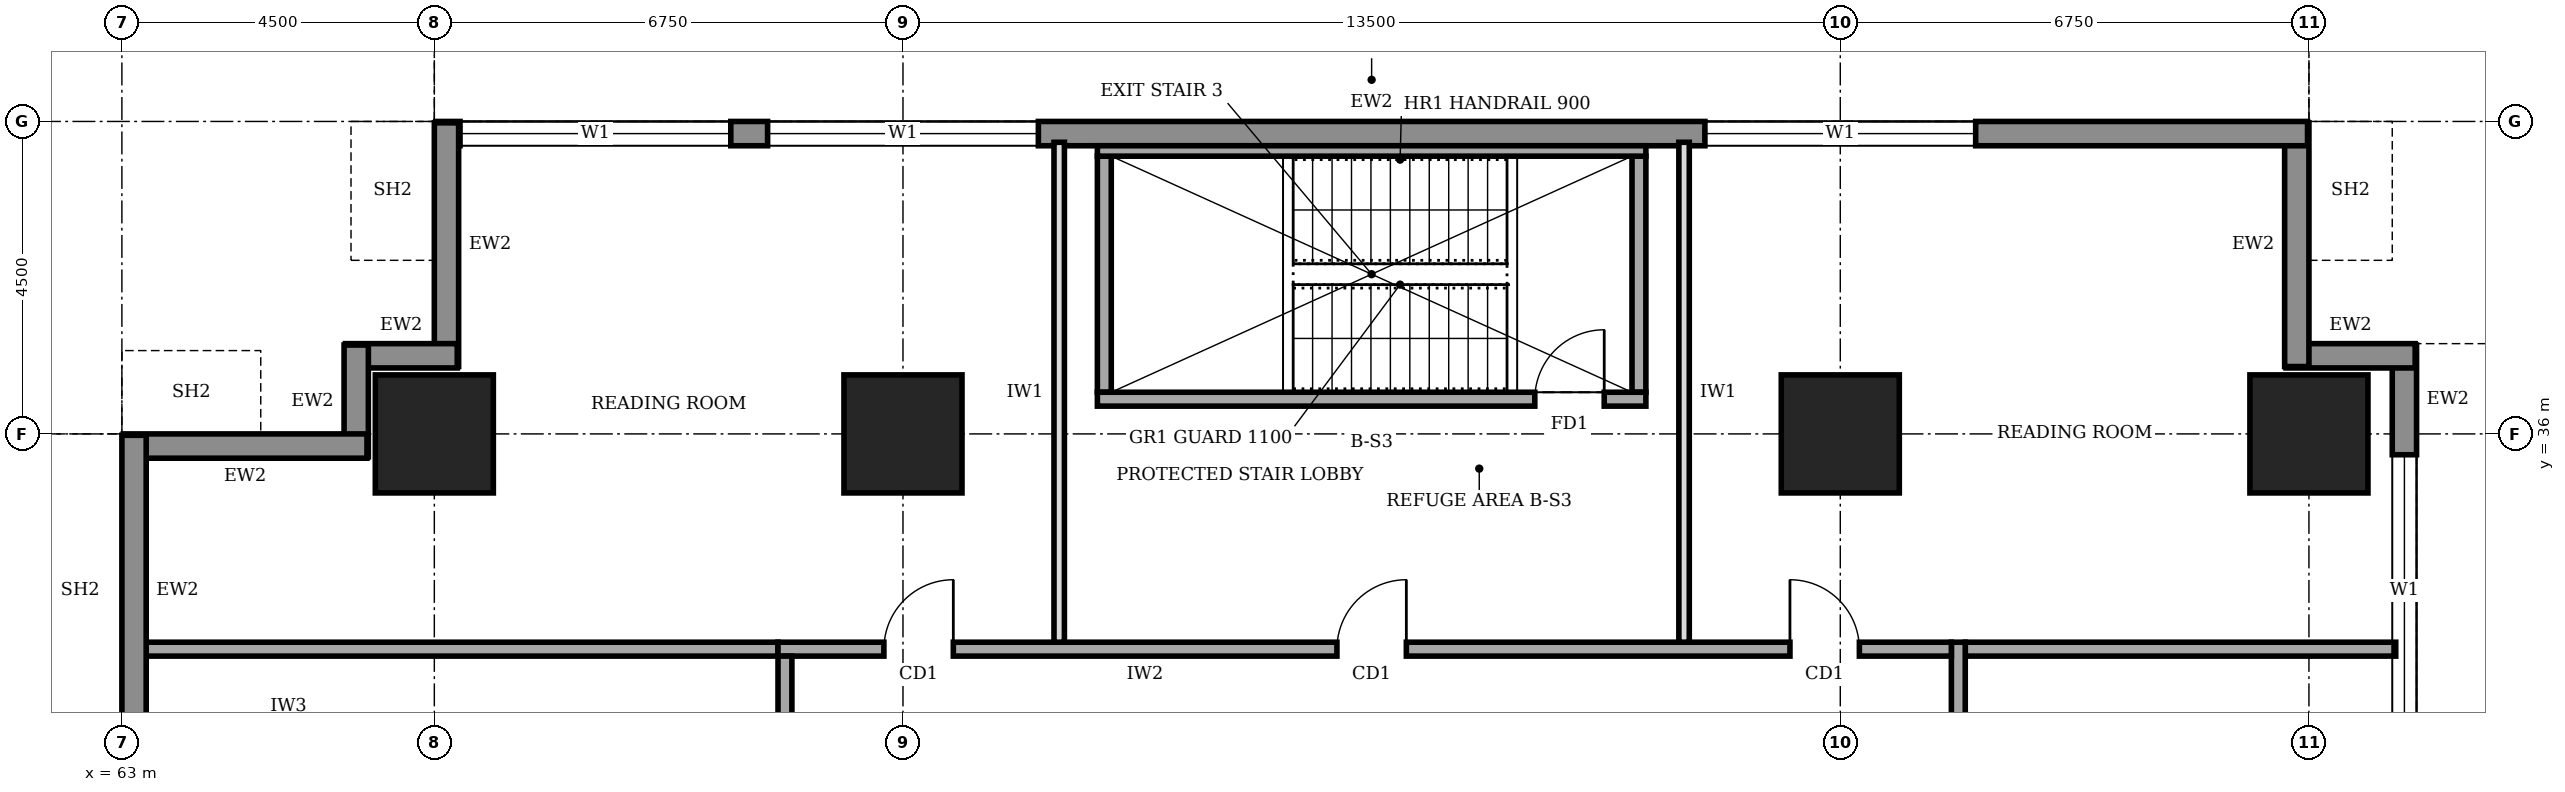
"""IFC4 building model, lengths in metres.
Left out: names, types, materials, properties, quantities, classifications, styles, units other than length and angle.
Written with IfcOpenShell. Run it as: python <this file> out.ifc"""

import sys

from ifc_helpers import new_model, si_unit, direction, frame, frame_2d, origin, origin_2d, place, context, subcontext, project, spatial, rectangle, extrude, element, fill, save


model = new_model("IFC4")
c1 = context("Model", 3, precision=1e-05, world=origin(), true_north=direction((0.0, 1.0)))
c2 = subcontext(c1, "Body", "Model", "MODEL_VIEW")
j1 = project(units=[si_unit("LENGTHUNIT", "METRE"), si_unit("PLANEANGLEUNIT", "RADIAN")], contexts=[c1])
p1 = place(None, origin())
s1 = spatial("IfcSite", under=j1, at=p1, CompositionType="ELEMENT")
p2 = place(p1, origin())
s2 = spatial("IfcBuilding", under=s1, at=p2, CompositionType="ELEMENT")
p3 = place(p2, frame((0.0, 0.0, 113.0)))
s3 = spatial("IfcBuildingStorey", under=s2, at=p3, CompositionType="ELEMENT", Elevation=113.0)
for number, where, z_axis, x_axis in (
    (1, (67.5, 36.0, 0.0), (0.0, 0.0, 1.0), (1.0, 0.0, 0.0)),
    (2, (74.25, 36.0, 0.0), (0.0, 0.0, 1.0), (1.0, 0.0, 0.0)),
    (3, (87.75, 36.0, 0.0), (0.0, 0.0, 1.0), (1.0, 0.0, 0.0)),
    (4, (94.5, 36.0, 0.0), (0.0, 0.0, 1.0), (1.0, 0.0, 0.0)),
):
    element("IfcColumn", number, at=place(p3, frame(where, z_axis=z_axis, x_axis=x_axis)), inside=s3, PredefinedType="COLUMN", context=c2, shape_type="SweptSolid", body=[
        extrude(rectangle(XDim=1.7, YDim=1.7, at=origin_2d()), origin(), (0.0, 0.0, 1.0), 4.0),
    ])
p4 = place(p3, frame((95.875, 3.32, 0.0), z_axis=(0.0, 0.0, 1.0), x_axis=(0.0, 1.0, 0.0)))
e5 = element("IfcWall", 5, at=p4, inside=s3, PredefinedType="STANDARD", context=c2, shape_type="SweptSolid", body=[
    extrude(rectangle(XDim=33.96, YDim=0.35, at=frame_2d((16.98, 0.0))), origin(), (0.0, 0.0, 1.0), 3.75),
])
p5 = place(p4, frame((1.48, 0.0, 0.9)))
e6 = element("IfcOpeningElement", 6, at=p5, cuts=e5, PredefinedType="OPENING", context=c2, shape_type="SweptSolid", body=[
    extrude(rectangle(XDim=3.9, YDim=2.2, at=frame_2d((1.95, 1.1))), frame((0.0, 0.185, 0.0), z_axis=(0.0, -1.0, 0.0), x_axis=(1.0, 0.0, 0.0)), (0.0, 0.0, 1.0), 0.37),
])
p6 = place(p4, frame((5.98, 0.0, 0.9)))
e7 = element("IfcOpeningElement", 7, at=p6, cuts=e5, PredefinedType="OPENING", context=c2, shape_type="SweptSolid", body=[
    extrude(rectangle(XDim=3.9, YDim=2.2, at=frame_2d((1.95, 1.1))), frame((0.0, 0.185, 0.0), z_axis=(0.0, -1.0, 0.0), x_axis=(1.0, 0.0, 0.0)), (0.0, 0.0, 1.0), 0.37),
])
p7 = place(p4, frame((10.48, 0.0, 0.9)))
e8 = element("IfcOpeningElement", 8, at=p7, cuts=e5, PredefinedType="OPENING", context=c2, shape_type="SweptSolid", body=[
    extrude(rectangle(XDim=3.9, YDim=2.2, at=frame_2d((1.95, 1.1))), frame((0.0, 0.185, 0.0), z_axis=(0.0, -1.0, 0.0), x_axis=(1.0, 0.0, 0.0)), (0.0, 0.0, 1.0), 0.37),
])
p8 = place(p4, frame((14.98, 0.0, 0.9)))
e9 = element("IfcOpeningElement", 9, at=p8, cuts=e5, PredefinedType="OPENING", context=c2, shape_type="SweptSolid", body=[
    extrude(rectangle(XDim=3.9, YDim=2.2, at=frame_2d((1.95, 1.1))), frame((0.0, 0.185, 0.0), z_axis=(0.0, -1.0, 0.0), x_axis=(1.0, 0.0, 0.0)), (0.0, 0.0, 1.0), 0.37),
])
p9 = place(p4, frame((19.48, 0.0, 0.9)))
e10 = element("IfcOpeningElement", 10, at=p9, cuts=e5, PredefinedType="OPENING", context=c2, shape_type="SweptSolid", body=[
    extrude(rectangle(XDim=3.9, YDim=2.2, at=frame_2d((1.95, 1.1))), frame((0.0, 0.185, 0.0), z_axis=(0.0, -1.0, 0.0), x_axis=(1.0, 0.0, 0.0)), (0.0, 0.0, 1.0), 0.37),
])
p10 = place(p4, frame((23.98, 0.0, 0.9)))
e11 = element("IfcOpeningElement", 11, at=p10, cuts=e5, PredefinedType="OPENING", context=c2, shape_type="SweptSolid", body=[
    extrude(rectangle(XDim=3.9, YDim=2.2, at=frame_2d((1.95, 1.1))), frame((0.0, 0.185, 0.0), z_axis=(0.0, -1.0, 0.0), x_axis=(1.0, 0.0, 0.0)), (0.0, 0.0, 1.0), 0.37),
])
p11 = place(p4, frame((28.48, 0.0, 0.9)))
e12 = element("IfcOpeningElement", 12, at=p11, cuts=e5, PredefinedType="OPENING", context=c2, shape_type="SweptSolid", body=[
    extrude(rectangle(XDim=3.9, YDim=2.2, at=frame_2d((1.95, 1.1))), frame((0.0, 0.185, 0.0), z_axis=(0.0, -1.0, 0.0), x_axis=(1.0, 0.0, 0.0)), (0.0, 0.0, 1.0), 0.37),
])
p12 = place(p3, frame((96.03, 37.125, 0.0), z_axis=(0.0, 0.0, 1.0), x_axis=(-1.0, 0.0, 0.0)))
e13 = element("IfcWall", 13, at=p12, inside=s3, PredefinedType="STANDARD", context=c2, shape_type="SweptSolid", body=[
    extrude(rectangle(XDim=1.86, YDim=0.35, at=frame_2d((0.93, 0.0))), origin(), (0.0, 0.0, 1.0), 3.75),
])
p13 = place(p3, frame((94.325, 36.97, 0.0), z_axis=(0.0, 0.0, 1.0), x_axis=(0.0, 1.0, 0.0)))
e14 = element("IfcWall", 14, at=p13, inside=s3, PredefinedType="STANDARD", context=c2, shape_type="SweptSolid", body=[
    extrude(rectangle(XDim=3.51, YDim=0.35, at=frame_2d((1.755, 0.0))), origin(), (0.0, 0.0, 1.0), 2.85),
])
p14 = place(p3, frame((94.48, 40.325, 0.0), z_axis=(0.0, 0.0, 1.0), x_axis=(-1.0, 0.0, 0.0)))
e15 = element("IfcWall", 15, at=p14, inside=s3, PredefinedType="STANDARD", context=c2, shape_type="SweptSolid", body=[
    extrude(rectangle(XDim=26.96, YDim=0.35, at=frame_2d((13.48, 0.0))), origin(), (0.0, 0.0, 1.0), 3.75),
])
p15 = place(p14, frame((22.71, 0.0, 0.9)))
e16 = element("IfcOpeningElement", 16, at=p15, cuts=e15, PredefinedType="OPENING", context=c2, shape_type="SweptSolid", body=[
    extrude(rectangle(XDim=3.9, YDim=2.2, at=frame_2d((1.95, 1.1))), frame((0.0, 0.185, 0.0), z_axis=(0.0, -1.0, 0.0), x_axis=(1.0, 0.0, 0.0)), (0.0, 0.0, 1.0), 0.37),
])
p16 = place(p14, frame((18.28, 0.0, 0.9)))
e17 = element("IfcOpeningElement", 17, at=p16, cuts=e15, PredefinedType="OPENING", context=c2, shape_type="SweptSolid", body=[
    extrude(rectangle(XDim=3.9, YDim=2.2, at=frame_2d((1.95, 1.1))), frame((0.0, 0.185, 0.0), z_axis=(0.0, -1.0, 0.0), x_axis=(1.0, 0.0, 0.0)), (0.0, 0.0, 1.0), 0.37),
])
p17 = place(p14, frame((4.78, 0.0, 0.9)))
e18 = element("IfcOpeningElement", 18, at=p17, cuts=e15, PredefinedType="OPENING", context=c2, shape_type="SweptSolid", body=[
    extrude(rectangle(XDim=3.9, YDim=2.2, at=frame_2d((1.95, 1.1))), frame((0.0, 0.185, 0.0), z_axis=(0.0, -1.0, 0.0), x_axis=(1.0, 0.0, 0.0)), (0.0, 0.0, 1.0), 0.37),
])
p18 = place(p3, frame((67.675, 40.48, 0.0), z_axis=(0.0, 0.0, 1.0), x_axis=(0.0, -1.0, 0.0)))
e19 = element("IfcWall", 19, at=p18, inside=s3, PredefinedType="STANDARD", context=c2, shape_type="SweptSolid", body=[
    extrude(rectangle(XDim=3.51, YDim=0.35, at=frame_2d((1.755, 0.0))), origin(), (0.0, 0.0, 1.0), 2.85),
])
for number, where, z_axis, x_axis in (
    (20, (67.83, 37.125, 0.0), (0.0, 0.0, 1.0), (-1.0, 0.0, 0.0)),
    (21, (66.375, 37.28, 0.0), (0.0, 0.0, 1.0), (0.0, -1.0, 0.0)),
):
    element("IfcWall", number, at=place(p3, frame(where, z_axis=z_axis, x_axis=x_axis)), inside=s3, PredefinedType="STANDARD", context=c2, shape_type="SweptSolid", body=[
        extrude(rectangle(XDim=1.61, YDim=0.35, at=frame_2d((0.805, 0.0))), origin(), (0.0, 0.0, 1.0), 3.75),
    ])
p19 = place(p3, frame((66.53, 35.825, 0.0), z_axis=(0.0, 0.0, 1.0), x_axis=(-1.0, 0.0, 0.0)))
e22 = element("IfcWall", 22, at=p19, inside=s3, PredefinedType="STANDARD", context=c2, shape_type="SweptSolid", body=[
    extrude(rectangle(XDim=3.51, YDim=0.35, at=frame_2d((1.755, 0.0))), origin(), (0.0, 0.0, 1.0), 2.85),
])
p20 = place(p3, frame((63.175, 35.98, 0.0), z_axis=(0.0, 0.0, 1.0), x_axis=(0.0, -1.0, 0.0)))
e23 = element("IfcWall", 23, at=p20, inside=s3, PredefinedType="STANDARD", context=c2, shape_type="SweptSolid", body=[
    extrude(rectangle(XDim=4.46, YDim=0.35, at=frame_2d((2.23, 0.0))), origin(), (0.0, 0.0, 1.0), 3.75),
])
p21 = place(p3, frame((89.45, 9.2, 0.0), z_axis=(0.0, 0.0, 1.0), x_axis=(0.0, 1.0, 0.0)))
e24 = element("IfcWall", 24, at=p21, inside=s3, PredefinedType="SOLIDWALL", context=c2, shape_type="SweptSolid", body=[
    extrude(rectangle(XDim=23.8, YDim=0.2, at=frame_2d((11.9, 0.0))), origin(), (0.0, 0.0, 1.0), 3.75),
])
p22 = place(p21, frame((1.625, 0.0, 0.0)))
e25 = element("IfcOpeningElement", 25, at=p22, cuts=e24, PredefinedType="OPENING", context=c2, shape_type="SweptSolid", body=[
    extrude(rectangle(XDim=1.0, YDim=2.1, at=frame_2d((0.5, 1.05))), frame((0.0, 0.11, 0.0), z_axis=(0.0, -1.0, 0.0), x_axis=(1.0, 0.0, 0.0)), (0.0, 0.0, 1.0), 0.22),
])
p23 = place(p21, frame((5.625, 0.0, 0.0)))
e26 = element("IfcOpeningElement", 26, at=p23, cuts=e24, PredefinedType="OPENING", context=c2, shape_type="SweptSolid", body=[
    extrude(rectangle(XDim=0.9, YDim=2.1, at=frame_2d((0.45, 1.05))), frame((0.0, 0.11, 0.0), z_axis=(0.0, -1.0, 0.0), x_axis=(1.0, 0.0, 0.0)), (0.0, 0.0, 1.0), 0.22),
])
p24 = place(p21, frame((10.35, 0.0, 0.0)))
e27 = element("IfcOpeningElement", 27, at=p24, cuts=e24, PredefinedType="OPENING", context=c2, shape_type="SweptSolid", body=[
    extrude(rectangle(XDim=0.9, YDim=2.1, at=frame_2d((0.45, 1.05))), frame((0.0, 0.11, 0.0), z_axis=(0.0, -1.0, 0.0), x_axis=(1.0, 0.0, 0.0)), (0.0, 0.0, 1.0), 0.22),
])
p25 = place(p21, frame((13.325, 0.0, 0.0)))
e28 = element("IfcOpeningElement", 28, at=p25, cuts=e24, PredefinedType="OPENING", context=c2, shape_type="SweptSolid", body=[
    extrude(rectangle(XDim=0.9, YDim=2.1, at=frame_2d((0.45, 1.05))), frame((0.0, 0.11, 0.0), z_axis=(0.0, -1.0, 0.0), x_axis=(1.0, 0.0, 0.0)), (0.0, 0.0, 1.0), 0.22),
])
p26 = place(p21, frame((16.15, 0.0, 0.0)))
e29 = element("IfcOpeningElement", 29, at=p26, cuts=e24, PredefinedType="OPENING", context=c2, shape_type="SweptSolid", body=[
    extrude(rectangle(XDim=1.0, YDim=2.1, at=frame_2d((0.5, 1.05))), frame((0.0, 0.11, 0.0), z_axis=(0.0, -1.0, 0.0), x_axis=(1.0, 0.0, 0.0)), (0.0, 0.0, 1.0), 0.22),
])
p27 = place(p21, frame((8.2, 0.0, 0.0)))
e30 = element("IfcOpeningElement", 30, at=p27, cuts=e24, PredefinedType="OPENING", context=c2, shape_type="SweptSolid", body=[
    extrude(rectangle(XDim=1.0, YDim=2.1, at=frame_2d((0.5, 1.05))), frame((0.0, 0.11, 0.0), z_axis=(0.0, -1.0, 0.0), x_axis=(1.0, 0.0, 0.0)), (0.0, 0.0, 1.0), 0.22),
])
p28 = place(p21, frame((20.225, 0.0, 0.0)))
e31 = element("IfcOpeningElement", 31, at=p28, cuts=e24, PredefinedType="OPENING", context=c2, shape_type="SweptSolid", body=[
    extrude(rectangle(XDim=1.0, YDim=2.1, at=frame_2d((0.5, 1.05))), frame((0.0, 0.11, 0.0), z_axis=(0.0, -1.0, 0.0), x_axis=(1.0, 0.0, 0.0)), (0.0, 0.0, 1.0), 0.22),
])
p29 = place(p3, frame((89.35, 32.9, 0.0), z_axis=(0.0, 0.0, 1.0), x_axis=(-1.0, 0.0, 0.0)))
e32 = element("IfcWall", 32, at=p29, inside=s3, PredefinedType="SOLIDWALL", context=c2, shape_type="SweptSolid", body=[
    extrude(rectangle(XDim=16.9, YDim=0.2, at=frame_2d((8.45, 0.0))), origin(), (0.0, 0.0, 1.0), 3.75),
])
p30 = place(p29, frame((14.375, 0.0, 0.0)))
e33 = element("IfcOpeningElement", 33, at=p30, cuts=e32, PredefinedType="OPENING", context=c2, shape_type="SweptSolid", body=[
    extrude(rectangle(XDim=1.0, YDim=2.1, at=frame_2d((0.5, 1.05))), frame((0.0, 0.11, 0.0), z_axis=(0.0, -1.0, 0.0), x_axis=(1.0, 0.0, 0.0)), (0.0, 0.0, 1.0), 0.22),
])
p31 = place(p29, frame((7.85, 0.0, 0.0)))
e34 = element("IfcOpeningElement", 34, at=p31, cuts=e32, PredefinedType="OPENING", context=c2, shape_type="SweptSolid", body=[
    extrude(rectangle(XDim=1.0, YDim=2.1, at=frame_2d((0.5, 1.05))), frame((0.0, 0.11, 0.0), z_axis=(0.0, -1.0, 0.0), x_axis=(1.0, 0.0, 0.0)), (0.0, 0.0, 1.0), 0.22),
])
p32 = place(p29, frame((1.325, 0.0, 0.0)))
e35 = element("IfcOpeningElement", 35, at=p32, cuts=e32, PredefinedType="OPENING", context=c2, shape_type="SweptSolid", body=[
    extrude(rectangle(XDim=1.0, YDim=2.1, at=frame_2d((0.5, 1.05))), frame((0.0, 0.11, 0.0), z_axis=(0.0, -1.0, 0.0), x_axis=(1.0, 0.0, 0.0)), (0.0, 0.0, 1.0), 0.22),
])
p33 = place(p3, frame((72.55, 32.8, 0.0), z_axis=(0.0, 0.0, 1.0), x_axis=(0.0, -1.0, 0.0)))
e36 = element("IfcWall", 36, at=p33, inside=s3, PredefinedType="SOLIDWALL", context=c2, shape_type="SweptSolid", body=[
    extrude(rectangle(XDim=23.8, YDim=0.2, at=frame_2d((11.9, 0.0))), origin(), (0.0, 0.0, 1.0), 3.75),
])
p34 = place(p33, frame((10.9, 0.0, 0.0)))
e37 = element("IfcOpeningElement", 37, at=p34, cuts=e36, PredefinedType="OPENING", context=c2, shape_type="SweptSolid", body=[
    extrude(rectangle(XDim=1.8, YDim=2.1, at=frame_2d((0.9, 1.05))), frame((0.0, 0.11, 0.0), z_axis=(0.0, -1.0, 0.0), x_axis=(1.0, 0.0, 0.0)), (0.0, 0.0, 1.0), 0.22),
])
p35 = place(p3, frame((63.3, 32.9, 0.0), z_axis=(0.0, 0.0, 1.0), x_axis=(1.0, 0.0, 0.0)))
e38 = element("IfcWall", 38, at=p35, inside=s3, PredefinedType="SOLIDWALL", context=c2, shape_type="SweptSolid", body=[
    extrude(rectangle(XDim=9.15, YDim=0.2, at=frame_2d((4.575, 0.0))), origin(), (0.0, 0.0, 1.0), 3.75),
])
p36 = place(p3, frame((89.55, 32.9, 0.0), z_axis=(0.0, 0.0, 1.0), x_axis=(1.0, 0.0, 0.0)))
e39 = element("IfcWall", 39, at=p36, inside=s3, PredefinedType="SOLIDWALL", context=c2, shape_type="SweptSolid", body=[
    extrude(rectangle(XDim=6.2, YDim=0.2, at=frame_2d((3.1, 0.0))), origin(), (0.0, 0.0, 1.0), 3.75),
])
for number, where, z_axis, x_axis in (
    (40, (76.5, 33.0, 0.0), (0.0, 0.0, 1.0), (0.0, 1.0, 0.0)),
    (41, (85.5, 33.0, 0.0), (0.0, 0.0, 1.0), (0.0, 1.0, 0.0)),
):
    element("IfcWall", number, at=place(p3, frame(where, z_axis=z_axis, x_axis=x_axis)), inside=s3, PredefinedType="PARTITIONING", context=c2, shape_type="SweptSolid", body=[
        extrude(rectangle(XDim=7.2, YDim=0.15, at=frame_2d((3.6, 0.0))), origin(), (0.0, 0.0, 1.0), 3.75),
    ])
p37 = place(p3, frame((77.05, 36.5, 0.0), z_axis=(0.0, 0.0, 1.0), x_axis=(1.0, 0.0, 0.0)))
e42 = element("IfcWall", 42, at=p37, inside=s3, PredefinedType="SOLIDWALL", context=c2, shape_type="SweptSolid", body=[
    extrude(rectangle(XDim=7.9, YDim=0.2, at=frame_2d((3.95, 0.0))), origin(), (0.0, 0.0, 1.0), 3.75),
])
p38 = place(p37, frame((6.3, 0.0, 0.0)))
e43 = element("IfcOpeningElement", 43, at=p38, cuts=e42, PredefinedType="OPENING", context=c2, shape_type="SweptSolid", body=[
    extrude(rectangle(XDim=1.0, YDim=2.1, at=frame_2d((0.5, 1.05))), frame((0.0, 0.11, 0.0), z_axis=(0.0, -1.0, 0.0), x_axis=(1.0, 0.0, 0.0)), (0.0, 0.0, 1.0), 0.22),
])
p39 = place(p3, frame((77.05, 40.075, 0.0), z_axis=(0.0, 0.0, 1.0), x_axis=(1.0, 0.0, 0.0)))
e44 = element("IfcWall", 44, at=p39, inside=s3, PredefinedType="SOLIDWALL", context=c2, shape_type="SweptSolid", body=[
    extrude(rectangle(XDim=7.9, YDim=0.15, at=frame_2d((3.95, 0.0))), origin(), (0.0, 0.0, 1.0), 3.75),
])
for number, where, z_axis, x_axis in (
    (45, (77.15, 36.6, 0.0), (0.0, 0.0, 1.0), (0.0, 1.0, 0.0)),
    (46, (84.85, 36.6, 0.0), (0.0, 0.0, 1.0), (0.0, 1.0, 0.0)),
):
    element("IfcWall", number, at=place(p3, frame(where, z_axis=z_axis, x_axis=x_axis)), inside=s3, PredefinedType="SOLIDWALL", context=c2, shape_type="SweptSolid", body=[
        extrude(rectangle(XDim=3.4, YDim=0.2, at=frame_2d((1.7, 0.0))), origin(), (0.0, 0.0, 1.0), 3.75),
    ])
p40 = place(p11, origin())
e47 = element("IfcWindow", 47, at=p40, inside=s3, PartitioningType="SINGLE_PANEL", PredefinedType="WINDOW", context=c2, shape_type="SweptSolid", body=[
    extrude(rectangle(XDim=3.9, YDim=2.2, at=frame_2d((1.95, 1.1))), frame((0.0, 0.03, 0.0), z_axis=(0.0, -1.0, 0.0), x_axis=(1.0, 0.0, 0.0)), (0.0, 0.0, 1.0), 0.06),
])
fill(e12, e47)
p41 = place(p15, origin())
e48 = element("IfcWindow", 48, at=p41, inside=s3, PartitioningType="SINGLE_PANEL", PredefinedType="WINDOW", context=c2, shape_type="SweptSolid", body=[
    extrude(rectangle(XDim=3.9, YDim=2.2, at=frame_2d((1.95, 1.1))), frame((0.0, 0.03, 0.0), z_axis=(0.0, -1.0, 0.0), x_axis=(1.0, 0.0, 0.0)), (0.0, 0.0, 1.0), 0.06),
])
fill(e16, e48)
p42 = place(p16, origin())
e49 = element("IfcWindow", 49, at=p42, inside=s3, PartitioningType="SINGLE_PANEL", PredefinedType="WINDOW", context=c2, shape_type="SweptSolid", body=[
    extrude(rectangle(XDim=3.9, YDim=2.2, at=frame_2d((1.95, 1.1))), frame((0.0, 0.03, 0.0), z_axis=(0.0, -1.0, 0.0), x_axis=(1.0, 0.0, 0.0)), (0.0, 0.0, 1.0), 0.06),
])
fill(e17, e49)
p43 = place(p17, origin())
e50 = element("IfcWindow", 50, at=p43, inside=s3, PartitioningType="SINGLE_PANEL", PredefinedType="WINDOW", context=c2, shape_type="SweptSolid", body=[
    extrude(rectangle(XDim=3.9, YDim=2.2, at=frame_2d((1.95, 1.1))), frame((0.0, 0.03, 0.0), z_axis=(0.0, -1.0, 0.0), x_axis=(1.0, 0.0, 0.0)), (0.0, 0.0, 1.0), 0.06),
])
fill(e18, e50)
p44 = place(p30, frame((1.0, 0.0, 0.0), z_axis=(0.0, 0.0, 1.0), x_axis=(-1.0, 0.0, 0.0)))
e51 = element("IfcDoor", 51, at=p44, inside=s3, OperationType="SINGLE_SWING_RIGHT", PredefinedType="DOOR", context=c2, shape_type="SweptSolid", body=[
    extrude(rectangle(XDim=1.0, YDim=2.1, at=frame_2d((0.5, 1.05))), frame((0.0, 0.025, 0.0), z_axis=(0.0, -1.0, 0.0), x_axis=(1.0, 0.0, 0.0)), (0.0, 0.0, 1.0), 0.05),
])
fill(e33, e51)
p45 = place(p31, frame((1.0, 0.0, 0.0), z_axis=(0.0, 0.0, 1.0), x_axis=(-1.0, 0.0, 0.0)))
e52 = element("IfcDoor", 52, at=p45, inside=s3, OperationType="SINGLE_SWING_RIGHT", PredefinedType="DOOR", context=c2, shape_type="SweptSolid", body=[
    extrude(rectangle(XDim=1.0, YDim=2.1, at=frame_2d((0.5, 1.05))), frame((0.0, 0.025, 0.0), z_axis=(0.0, -1.0, 0.0), x_axis=(1.0, 0.0, 0.0)), (0.0, 0.0, 1.0), 0.05),
])
fill(e34, e52)
p46 = place(p32, frame((1.0, 0.0, 0.0), z_axis=(0.0, 0.0, 1.0), x_axis=(-1.0, 0.0, 0.0)))
e53 = element("IfcDoor", 53, at=p46, inside=s3, OperationType="SINGLE_SWING_LEFT", PredefinedType="DOOR", context=c2, shape_type="SweptSolid", body=[
    extrude(rectangle(XDim=1.0, YDim=2.1, at=frame_2d((0.5, 1.05))), frame((0.0, 0.025, 0.0), z_axis=(0.0, -1.0, 0.0), x_axis=(1.0, 0.0, 0.0)), (0.0, 0.0, 1.0), 0.05),
])
fill(e35, e53)
p47 = place(p38, origin())
e54 = element("IfcDoor", 54, at=p47, inside=s3, OperationType="SINGLE_SWING_RIGHT", PredefinedType="DOOR", context=c2, shape_type="SweptSolid", body=[
    extrude(rectangle(XDim=1.0, YDim=2.1, at=frame_2d((0.5, 1.05))), frame((0.0, 0.025, 0.0), z_axis=(0.0, -1.0, 0.0), x_axis=(1.0, 0.0, 0.0)), (0.0, 0.0, 1.0), 0.05),
])
fill(e43, e54)
save(model, sys.argv[1])
